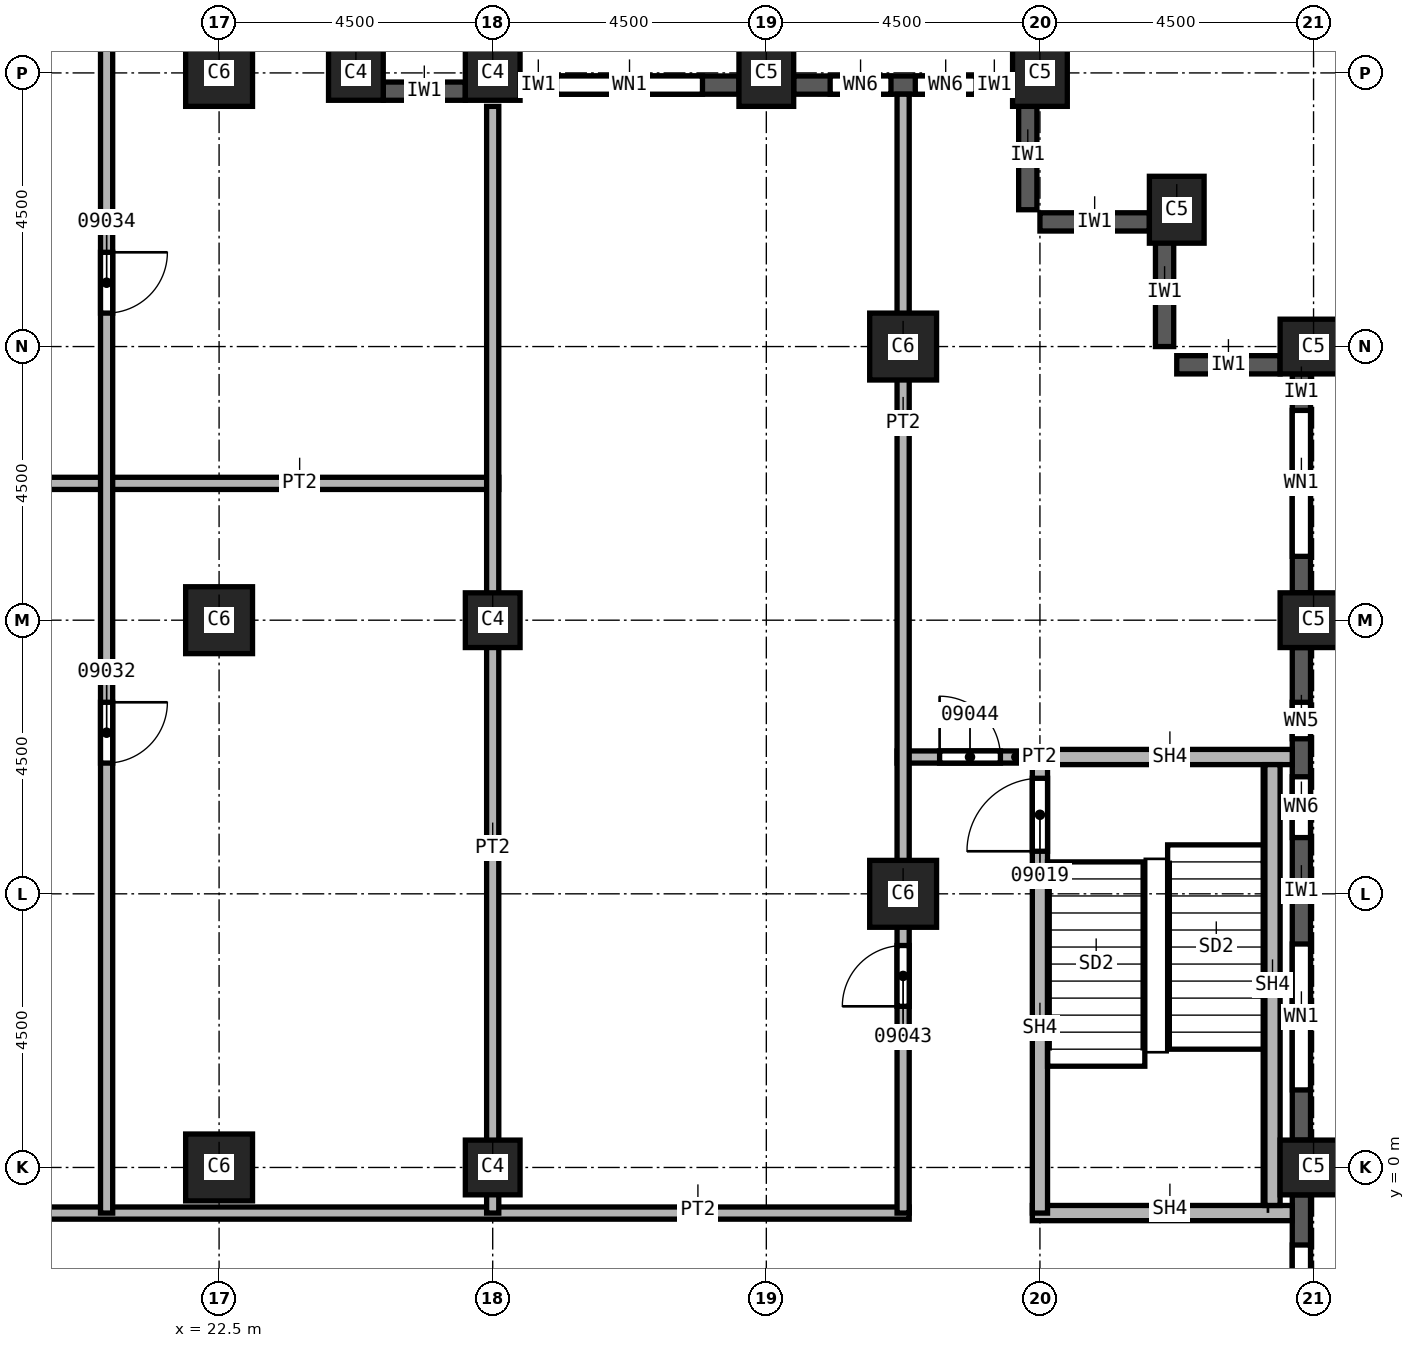
"""IFC4 building model, lengths in metres.
Left out: names, types, materials, properties, quantities, classifications, styles, units other than length and angle.
Written with IfcOpenShell. Run it as: python <this file> out.ifc"""

import sys

from ifc_helpers import new_model, si_unit, direction, frame, frame_2d, origin, origin_2d, place, context, subcontext, project, spatial, rectangle, extrude, element, fill, save


model = new_model("IFC4")
c1 = context("Model", 3, precision=1e-05, world=origin(), true_north=direction((0.0, 1.0)))
c2 = subcontext(c1, "Body", "Model", "MODEL_VIEW")
j1 = project(units=[si_unit("LENGTHUNIT", "METRE"), si_unit("PLANEANGLEUNIT", "RADIAN")], contexts=[c1])
p1 = place(None, origin())
s1 = spatial("IfcSite", under=j1, at=p1, CompositionType="ELEMENT")
p2 = place(p1, origin())
s2 = spatial("IfcBuilding", under=s1, at=p2, CompositionType="ELEMENT")
p3 = place(p2, frame((0.0, 0.0, 166.0)))
s3 = spatial("IfcBuildingStorey", under=s2, at=p3, CompositionType="ELEMENT", Elevation=166.0)
for number, where, z_axis, x_axis in (
    (1, (40.5, 0.0, 0.0), (0.0, 0.0, 1.0), (0.0, 1.0, 0.0)),
    (2, (40.5, 9.0, 0.0), (0.0, 0.0, 1.0), (0.0, 1.0, 0.0)),
    (3, (40.5, 13.5, 0.0), (0.0, 0.0, 1.0), (0.0, 1.0, 0.0)),
    (4, (38.25, 15.75, 0.0), (0.0, 0.0, 1.0), (1.0, 0.0, 0.0)),
    (5, (31.5, 18.0, 0.0), (0.0, 0.0, 1.0), (1.0, 0.0, 0.0)),
    (6, (36.0, 18.0, 0.0), (0.0, 0.0, 1.0), (1.0, 0.0, 0.0)),
):
    element("IfcColumn", number, at=place(p3, frame(where, z_axis=z_axis, x_axis=x_axis)), inside=s3, PredefinedType="COLUMN", context=c2, shape_type="SweptSolid", body=[
        extrude(rectangle(XDim=0.9, YDim=1.1, at=origin_2d()), origin(), (0.0, 0.0, 1.0), 3.7),
    ])
for number, where, z_axis, x_axis in (
    (7, (33.75, 4.5, 0.0), (0.0, 0.0, 1.0), (1.0, 0.0, 0.0)),
    (8, (33.75, 13.5, 0.0), (0.0, 0.0, 1.0), (1.0, 0.0, 0.0)),
    (9, (22.5, 0.0, 0.0), (0.0, 0.0, 1.0), (1.0, 0.0, 0.0)),
    (10, (22.5, 9.0, 0.0), (0.0, 0.0, 1.0), (1.0, 0.0, 0.0)),
    (11, (22.5, 18.0, 0.0), (0.0, 0.0, 1.0), (1.0, 0.0, 0.0)),
):
    element("IfcColumn", number, at=place(p3, frame(where, z_axis=z_axis, x_axis=x_axis)), inside=s3, PredefinedType="COLUMN", context=c2, shape_type="SweptSolid", body=[
        extrude(rectangle(XDim=1.1, YDim=1.1, at=origin_2d()), origin(), (0.0, 0.0, 1.0), 3.7),
    ])
for number, where, z_axis, x_axis in (
    (12, (27.0, 0.0, 0.0), (0.0, 0.0, 1.0), (1.0, 0.0, 0.0)),
    (13, (27.0, 9.0, 0.0), (0.0, 0.0, 1.0), (1.0, 0.0, 0.0)),
    (14, (27.0, 18.0, 0.0), (0.0, 0.0, 1.0), (1.0, 0.0, 0.0)),
    (15, (24.75, 18.0, 0.0), (0.0, 0.0, 1.0), (1.0, 0.0, 0.0)),
):
    element("IfcColumn", number, at=place(p3, frame(where, z_axis=z_axis, x_axis=x_axis)), inside=s3, PredefinedType="COLUMN", context=c2, shape_type="SweptSolid", body=[
        extrude(rectangle(XDim=0.9, YDim=0.9, at=origin_2d()), origin(), (0.0, 0.0, 1.0), 3.7),
    ])
p4 = place(p3, frame((39.95, 13.2, 0.0), z_axis=(0.0, 0.0, 1.0), x_axis=(-1.0, 0.0, 0.0)))
e16 = element("IfcWall", 16, at=p4, inside=s3, PredefinedType="SOLIDWALL", context=c2, shape_type="SweptSolid", body=[
    extrude(rectangle(XDim=1.7, YDim=0.3, at=frame_2d((0.85, 0.0))), origin(), (0.0, 0.0, 1.0), 3.1),
])
for number, where, z_axis, x_axis in (
    (17, (38.05, 15.3, 0.0), (0.0, 0.0, 1.0), (0.0, -1.0, 0.0)),
    (18, (37.8, 15.55, 0.0), (0.0, 0.0, 1.0), (-1.0, 0.0, 0.0)),
    (19, (35.8, 17.55, 0.0), (0.0, 0.0, 1.0), (0.0, -1.0, 0.0)),
):
    element("IfcWall", number, at=place(p3, frame(where, z_axis=z_axis, x_axis=x_axis)), inside=s3, PredefinedType="SOLIDWALL", context=c2, shape_type="SweptSolid", body=[
        extrude(rectangle(XDim=1.8, YDim=0.3, at=frame_2d((0.9, 0.0))), origin(), (0.0, 0.0, 1.0), 3.1),
    ])
p5 = place(p3, frame((40.3, -8.55, 0.0), z_axis=(0.0, 0.0, 1.0), x_axis=(0.0, 1.0, 0.0)))
e20 = element("IfcWall", 20, at=p5, inside=s3, PredefinedType="SOLIDWALL", context=c2, shape_type="SweptSolid", body=[
    extrude(rectangle(XDim=8.1, YDim=0.3, at=frame_2d((4.05, 0.0))), origin(), (0.0, 0.0, 1.0), 3.1),
])
p6 = place(p5, frame((0.825, 0.0, 0.8)))
e21 = element("IfcOpeningElement", 21, at=p6, cuts=e20, PredefinedType="OPENING", context=c2, shape_type="SweptSolid", body=[
    extrude(rectangle(XDim=2.4, YDim=1.95, at=frame_2d((1.2, 0.975))), frame((0.0, 0.15, 0.0), z_axis=(0.0, -1.0, 0.0), x_axis=(1.0, 0.0, 0.0)), (0.0, 0.0, 1.0), 0.3),
])
p7 = place(p5, frame((4.875, 0.0, 0.8)))
e22 = element("IfcOpeningElement", 22, at=p7, cuts=e20, PredefinedType="OPENING", context=c2, shape_type="SweptSolid", body=[
    extrude(rectangle(XDim=2.4, YDim=1.95, at=frame_2d((1.2, 0.975))), frame((0.0, 0.15, 0.0), z_axis=(0.0, -1.0, 0.0), x_axis=(1.0, 0.0, 0.0)), (0.0, 0.0, 1.0), 0.3),
])
p8 = place(p3, frame((40.3, 0.45, 0.0), z_axis=(0.0, 0.0, 1.0), x_axis=(0.0, 1.0, 0.0)))
e23 = element("IfcWall", 23, at=p8, inside=s3, PredefinedType="SOLIDWALL", context=c2, shape_type="SweptSolid", body=[
    extrude(rectangle(XDim=8.1, YDim=0.3, at=frame_2d((4.05, 0.0))), origin(), (0.0, 0.0, 1.0), 3.1),
])
p9 = place(p8, frame((0.825, 0.0, 0.8)))
e24 = element("IfcOpeningElement", 24, at=p9, cuts=e23, PredefinedType="OPENING", context=c2, shape_type="SweptSolid", body=[
    extrude(rectangle(XDim=2.4, YDim=1.95, at=frame_2d((1.2, 0.975))), frame((0.0, 0.15, 0.0), z_axis=(0.0, -1.0, 0.0), x_axis=(1.0, 0.0, 0.0)), (0.0, 0.0, 1.0), 0.3),
])
p10 = place(p8, frame((4.975, 0.0, 0.8)))
e25 = element("IfcOpeningElement", 25, at=p10, cuts=e23, PredefinedType="OPENING", context=c2, shape_type="SweptSolid", body=[
    extrude(rectangle(XDim=1.0, YDim=1.95, at=frame_2d((0.5, 0.975))), frame((0.0, 0.15, 0.0), z_axis=(0.0, -1.0, 0.0), x_axis=(1.0, 0.0, 0.0)), (0.0, 0.0, 1.0), 0.3),
])
p11 = place(p8, frame((6.6, 0.0, 0.8)))
e26 = element("IfcOpeningElement", 26, at=p11, cuts=e23, PredefinedType="OPENING", context=c2, shape_type="SweptSolid", body=[
    extrude(rectangle(XDim=0.6, YDim=1.95, at=frame_2d((0.3, 0.975))), frame((0.0, 0.15, 0.0), z_axis=(0.0, -1.0, 0.0), x_axis=(1.0, 0.0, 0.0)), (0.0, 0.0, 1.0), 0.3),
])
p12 = place(p3, frame((40.3, 9.45, 0.0), z_axis=(0.0, 0.0, 1.0), x_axis=(0.0, 1.0, 0.0)))
e27 = element("IfcWall", 27, at=p12, inside=s3, PredefinedType="SOLIDWALL", context=c2, shape_type="SweptSolid", body=[
    extrude(rectangle(XDim=3.6, YDim=0.3, at=frame_2d((1.8, 0.0))), origin(), (0.0, 0.0, 1.0), 3.1),
])
p13 = place(p12, frame((0.6, 0.0, 0.8)))
e28 = element("IfcOpeningElement", 28, at=p13, cuts=e27, PredefinedType="OPENING", context=c2, shape_type="SweptSolid", body=[
    extrude(rectangle(XDim=2.4, YDim=1.95, at=frame_2d((1.2, 0.975))), frame((0.0, 0.15, 0.0), z_axis=(0.0, -1.0, 0.0), x_axis=(1.0, 0.0, 0.0)), (0.0, 0.0, 1.0), 0.3),
])
p14 = place(p3, frame((35.55, 17.8, 0.0), z_axis=(0.0, 0.0, 1.0), x_axis=(-1.0, 0.0, 0.0)))
e29 = element("IfcWall", 29, at=p14, inside=s3, PredefinedType="SOLIDWALL", context=c2, shape_type="SweptSolid", body=[
    extrude(rectangle(XDim=3.6, YDim=0.3, at=frame_2d((1.8, 0.0))), origin(), (0.0, 0.0, 1.0), 3.1),
])
p15 = place(p14, frame((0.6, 0.0, 0.8)))
e30 = element("IfcOpeningElement", 30, at=p15, cuts=e29, PredefinedType="OPENING", context=c2, shape_type="SweptSolid", body=[
    extrude(rectangle(XDim=1.0, YDim=1.95, at=frame_2d((0.5, 0.975))), frame((0.0, 0.15, 0.0), z_axis=(0.0, -1.0, 0.0), x_axis=(1.0, 0.0, 0.0)), (0.0, 0.0, 1.0), 0.3),
])
p16 = place(p14, frame((2.0, 0.0, 0.8)))
e31 = element("IfcOpeningElement", 31, at=p16, cuts=e29, PredefinedType="OPENING", context=c2, shape_type="SweptSolid", body=[
    extrude(rectangle(XDim=1.0, YDim=1.95, at=frame_2d((0.5, 0.975))), frame((0.0, 0.15, 0.0), z_axis=(0.0, -1.0, 0.0), x_axis=(1.0, 0.0, 0.0)), (0.0, 0.0, 1.0), 0.3),
])
p17 = place(p3, frame((31.05, 17.8, 0.0), z_axis=(0.0, 0.0, 1.0), x_axis=(-1.0, 0.0, 0.0)))
e32 = element("IfcWall", 32, at=p17, inside=s3, PredefinedType="SOLIDWALL", context=c2, shape_type="SweptSolid", body=[
    extrude(rectangle(XDim=3.6, YDim=0.3, at=frame_2d((1.8, 0.0))), origin(), (0.0, 0.0, 1.0), 3.1),
])
p18 = place(p17, frame((0.6, 0.0, 0.8)))
e33 = element("IfcOpeningElement", 33, at=p18, cuts=e32, PredefinedType="OPENING", context=c2, shape_type="SweptSolid", body=[
    extrude(rectangle(XDim=2.4, YDim=1.95, at=frame_2d((1.2, 0.975))), frame((0.0, 0.15, 0.0), z_axis=(0.0, -1.0, 0.0), x_axis=(1.0, 0.0, 0.0)), (0.0, 0.0, 1.0), 0.3),
])
p19 = place(p3, frame((26.55, 17.7, 0.0), z_axis=(0.0, 0.0, 1.0), x_axis=(-1.0, 0.0, 0.0)))
e34 = element("IfcWall", 34, at=p19, inside=s3, PredefinedType="SOLIDWALL", context=c2, shape_type="SweptSolid", body=[
    extrude(rectangle(XDim=1.35, YDim=0.3, at=frame_2d((0.675, 0.0))), origin(), (0.0, 0.0, 1.0), 3.1),
])
p20 = place(p3, frame((15.4, -0.75, 0.0), z_axis=(0.0, 0.0, 1.0), x_axis=(1.0, 0.0, 0.0)))
e35 = element("IfcWall", 35, at=p20, inside=s3, PredefinedType="PARTITIONING", context=c2, shape_type="SweptSolid", body=[
    extrude(rectangle(XDim=18.45, YDim=0.2, at=frame_2d((9.225, 0.0))), origin(), (0.0, 0.0, 1.0), 3.7),
])
p21 = place(p3, frame((15.4, 11.25, 0.0), z_axis=(0.0, 0.0, 1.0), x_axis=(1.0, 0.0, 0.0)))
e36 = element("IfcWall", 36, at=p21, inside=s3, PredefinedType="PARTITIONING", context=c2, shape_type="SweptSolid", body=[
    extrude(rectangle(XDim=11.7, YDim=0.2, at=frame_2d((5.85, 0.0))), origin(), (0.0, 0.0, 1.0), 3.7),
])
p22 = place(p3, frame((20.65, 23.25, 0.0), z_axis=(0.0, 0.0, 1.0), x_axis=(0.0, -1.0, 0.0)))
e37 = element("IfcWall", 37, at=p22, inside=s3, PredefinedType="PARTITIONING", context=c2, shape_type="SweptSolid", body=[
    extrude(rectangle(XDim=24.0, YDim=0.2, at=frame_2d((12.0, 0.0))), origin(), (0.0, 0.0, 1.0), 3.7),
])
p23 = place(p22, frame((15.6, 0.0, 0.0)))
e38 = element("IfcOpeningElement", 38, at=p23, cuts=e37, PredefinedType="OPENING", context=c2, shape_type="SweptSolid", body=[
    extrude(rectangle(XDim=1.0, YDim=2.1, at=frame_2d((0.5, 1.05))), frame((0.0, 0.1, 0.0), z_axis=(0.0, -1.0, 0.0), x_axis=(1.0, 0.0, 0.0)), (0.0, 0.0, 1.0), 0.2),
])
p24 = place(p22, frame((8.2, 0.0, 0.0)))
e39 = element("IfcOpeningElement", 39, at=p24, cuts=e37, PredefinedType="OPENING", context=c2, shape_type="SweptSolid", body=[
    extrude(rectangle(XDim=1.0, YDim=2.1, at=frame_2d((0.5, 1.05))), frame((0.0, 0.1, 0.0), z_axis=(0.0, -1.0, 0.0), x_axis=(1.0, 0.0, 0.0)), (0.0, 0.0, 1.0), 0.2),
])
p25 = place(p3, frame((27.0, 17.45, 0.0), z_axis=(0.0, 0.0, 1.0), x_axis=(0.0, -1.0, 0.0)))
e40 = element("IfcWall", 40, at=p25, inside=s3, PredefinedType="PARTITIONING", context=c2, shape_type="SweptSolid", body=[
    extrude(rectangle(XDim=18.2, YDim=0.2, at=frame_2d((9.1, 0.0))), origin(), (0.0, 0.0, 1.0), 3.7),
])
p26 = place(p3, frame((33.65, 6.75, 0.0), z_axis=(0.0, 0.0, 1.0), x_axis=(1.0, 0.0, 0.0)))
e41 = element("IfcWall", 41, at=p26, inside=s3, PredefinedType="PARTITIONING", context=c2, shape_type="SweptSolid", body=[
    extrude(rectangle(XDim=2.35, YDim=0.2, at=frame_2d((1.175, 0.0))), origin(), (0.0, 0.0, 1.0), 3.7),
])
p27 = place(p26, frame((0.7, 0.0, 0.0)))
e42 = element("IfcOpeningElement", 42, at=p27, cuts=e41, PredefinedType="OPENING", context=c2, shape_type="SweptSolid", body=[
    extrude(rectangle(XDim=1.0, YDim=2.1, at=frame_2d((0.5, 1.05))), frame((0.0, 0.1, 0.0), z_axis=(0.0, -1.0, 0.0), x_axis=(1.0, 0.0, 0.0)), (0.0, 0.0, 1.0), 0.2),
])
p28 = place(p3, frame((33.75, -0.75, 0.0), z_axis=(0.0, 0.0, 1.0), x_axis=(0.0, 1.0, 0.0)))
e43 = element("IfcWall", 43, at=p28, inside=s3, PredefinedType="PARTITIONING", context=c2, shape_type="SweptSolid", body=[
    extrude(rectangle(XDim=18.4, YDim=0.2, at=frame_2d((9.2, 0.0))), origin(), (0.0, 0.0, 1.0), 3.7),
])
p29 = place(p28, frame((3.4, 0.0, 0.0)))
e44 = element("IfcOpeningElement", 44, at=p29, cuts=e43, PredefinedType="OPENING", context=c2, shape_type="SweptSolid", body=[
    extrude(rectangle(XDim=1.0, YDim=2.1, at=frame_2d((0.5, 1.05))), frame((0.0, 0.1, 0.0), z_axis=(0.0, -1.0, 0.0), x_axis=(1.0, 0.0, 0.0)), (0.0, 0.0, 1.0), 0.2),
])
p30 = place(p3, frame((35.875, -0.75, 0.0), z_axis=(0.0, 0.0, 1.0), x_axis=(1.0, 0.0, 0.0)))
e45 = element("IfcWall", 45, at=p30, inside=s3, PredefinedType="SOLIDWALL", context=c2, shape_type="SweptSolid", body=[
    extrude(rectangle(XDim=4.275, YDim=0.25, at=frame_2d((2.137, 0.0))), origin(), (0.0, 0.0, 1.0), 3.7),
])
p31 = place(p3, frame((36.0, -0.75, 0.0), z_axis=(0.0, 0.0, 1.0), x_axis=(0.0, 1.0, 0.0)))
e46 = element("IfcWall", 46, at=p31, inside=s3, PredefinedType="SOLIDWALL", context=c2, shape_type="SweptSolid", body=[
    extrude(rectangle(XDim=7.625, YDim=0.25, at=frame_2d((3.812, 0.0))), origin(), (0.0, 0.0, 1.0), 3.7),
])
p32 = place(p31, frame((5.95, 0.0, 0.0)))
e47 = element("IfcOpeningElement", 47, at=p32, cuts=e46, PredefinedType="OPENING", context=c2, shape_type="SweptSolid", body=[
    extrude(rectangle(XDim=1.2, YDim=2.1, at=frame_2d((0.6, 1.05))), frame((0.0, 0.125, 0.0), z_axis=(0.0, -1.0, 0.0), x_axis=(1.0, 0.0, 0.0)), (0.0, 0.0, 1.0), 0.25),
])
p33 = place(p3, frame((36.0, 6.75, 0.0), z_axis=(0.0, 0.0, 1.0), x_axis=(1.0, 0.0, 0.0)))
e48 = element("IfcWall", 48, at=p33, inside=s3, PredefinedType="SOLIDWALL", context=c2, shape_type="SweptSolid", body=[
    extrude(rectangle(XDim=4.15, YDim=0.25, at=frame_2d((2.075, 0.0))), origin(), (0.0, 0.0, 1.0), 3.7),
])
p34 = place(p3, frame((39.825, -0.625, 0.0), z_axis=(0.0, 0.0, 1.0), x_axis=(0.0, 1.0, 0.0)))
e49 = element("IfcWall", 49, at=p34, inside=s3, PredefinedType="SOLIDWALL", context=c2, shape_type="SweptSolid", body=[
    extrude(rectangle(XDim=7.25, YDim=0.25, at=frame_2d((3.625, 0.0))), origin(), (0.0, 0.0, 1.0), 3.7),
])
p35 = place(p7, origin())
e50 = element("IfcWindow", 50, at=p35, inside=s3, PartitioningType="SINGLE_PANEL", PredefinedType="WINDOW", context=c2, shape_type="SweptSolid", body=[
    extrude(rectangle(XDim=2.4, YDim=1.95, at=frame_2d((1.2, 0.975))), frame((0.0, 0.03, 0.0), z_axis=(0.0, -1.0, 0.0), x_axis=(1.0, 0.0, 0.0)), (0.0, 0.0, 1.0), 0.06),
])
fill(e22, e50)
p36 = place(p9, origin())
e51 = element("IfcWindow", 51, at=p36, inside=s3, PartitioningType="SINGLE_PANEL", PredefinedType="WINDOW", context=c2, shape_type="SweptSolid", body=[
    extrude(rectangle(XDim=2.4, YDim=1.95, at=frame_2d((1.2, 0.975))), frame((0.0, 0.03, 0.0), z_axis=(0.0, -1.0, 0.0), x_axis=(1.0, 0.0, 0.0)), (0.0, 0.0, 1.0), 0.06),
])
fill(e24, e51)
p37 = place(p13, origin())
e52 = element("IfcWindow", 52, at=p37, inside=s3, PartitioningType="SINGLE_PANEL", PredefinedType="WINDOW", context=c2, shape_type="SweptSolid", body=[
    extrude(rectangle(XDim=2.4, YDim=1.95, at=frame_2d((1.2, 0.975))), frame((0.0, 0.03, 0.0), z_axis=(0.0, -1.0, 0.0), x_axis=(1.0, 0.0, 0.0)), (0.0, 0.0, 1.0), 0.06),
])
fill(e28, e52)
p38 = place(p18, origin())
e53 = element("IfcWindow", 53, at=p38, inside=s3, PartitioningType="SINGLE_PANEL", PredefinedType="WINDOW", context=c2, shape_type="SweptSolid", body=[
    extrude(rectangle(XDim=2.4, YDim=1.95, at=frame_2d((1.2, 0.975))), frame((0.0, 0.03, 0.0), z_axis=(0.0, -1.0, 0.0), x_axis=(1.0, 0.0, 0.0)), (0.0, 0.0, 1.0), 0.06),
])
fill(e33, e53)
p39 = place(p32, origin())
e54 = element("IfcDoor", 54, at=p39, inside=s3, OperationType="SINGLE_SWING_RIGHT", PredefinedType="DOOR", context=c2, shape_type="SweptSolid", body=[
    extrude(rectangle(XDim=1.2, YDim=2.1, at=frame_2d((0.6, 1.05))), frame((0.0, 0.025, 0.0), z_axis=(0.0, -1.0, 0.0), x_axis=(1.0, 0.0, 0.0)), (0.0, 0.0, 1.0), 0.05),
])
fill(e47, e54)
p40 = place(p23, origin())
e55 = element("IfcDoor", 55, at=p40, inside=s3, OperationType="SINGLE_SWING_LEFT", PredefinedType="DOOR", context=c2, shape_type="SweptSolid", body=[
    extrude(rectangle(XDim=1.0, YDim=2.1, at=frame_2d((0.5, 1.05))), frame((0.0, 0.025, 0.0), z_axis=(0.0, -1.0, 0.0), x_axis=(1.0, 0.0, 0.0)), (0.0, 0.0, 1.0), 0.05),
])
fill(e38, e55)
p41 = place(p24, origin())
e56 = element("IfcDoor", 56, at=p41, inside=s3, OperationType="SINGLE_SWING_LEFT", PredefinedType="DOOR", context=c2, shape_type="SweptSolid", body=[
    extrude(rectangle(XDim=1.0, YDim=2.1, at=frame_2d((0.5, 1.05))), frame((0.0, 0.025, 0.0), z_axis=(0.0, -1.0, 0.0), x_axis=(1.0, 0.0, 0.0)), (0.0, 0.0, 1.0), 0.05),
])
fill(e39, e56)
p42 = place(p29, origin())
e57 = element("IfcDoor", 57, at=p42, inside=s3, OperationType="SINGLE_SWING_RIGHT", PredefinedType="DOOR", context=c2, shape_type="SweptSolid", body=[
    extrude(rectangle(XDim=1.0, YDim=2.1, at=frame_2d((0.5, 1.05))), frame((0.0, 0.025, 0.0), z_axis=(0.0, -1.0, 0.0), x_axis=(1.0, 0.0, 0.0)), (0.0, 0.0, 1.0), 0.05),
])
fill(e44, e57)
p43 = place(p27, origin())
e58 = element("IfcDoor", 58, at=p43, inside=s3, OperationType="SINGLE_SWING_LEFT", PredefinedType="DOOR", context=c2, shape_type="SweptSolid", body=[
    extrude(rectangle(XDim=1.0, YDim=2.1, at=frame_2d((0.5, 1.05))), frame((0.0, 0.025, 0.0), z_axis=(0.0, -1.0, 0.0), x_axis=(1.0, 0.0, 0.0)), (0.0, 0.0, 1.0), 0.05),
])
fill(e42, e58)
p44 = place(p10, origin())
e59 = element("IfcWindow", 59, at=p44, inside=s3, PartitioningType="SINGLE_PANEL", PredefinedType="WINDOW", context=c2, shape_type="SweptSolid", body=[
    extrude(rectangle(XDim=1.0, YDim=1.95, at=frame_2d((0.5, 0.975))), frame((0.0, 0.03, 0.0), z_axis=(0.0, -1.0, 0.0), x_axis=(1.0, 0.0, 0.0)), (0.0, 0.0, 1.0), 0.06),
])
fill(e25, e59)
p45 = place(p11, origin())
e60 = element("IfcWindow", 60, at=p45, inside=s3, PartitioningType="SINGLE_PANEL", PredefinedType="WINDOW", context=c2, shape_type="SweptSolid", body=[
    extrude(rectangle(XDim=0.6, YDim=1.95, at=frame_2d((0.3, 0.975))), frame((0.0, 0.03, 0.0), z_axis=(0.0, -1.0, 0.0), x_axis=(1.0, 0.0, 0.0)), (0.0, 0.0, 1.0), 0.06),
])
fill(e26, e60)
p46 = place(p15, origin())
e61 = element("IfcWindow", 61, at=p46, inside=s3, PartitioningType="SINGLE_PANEL", PredefinedType="WINDOW", context=c2, shape_type="SweptSolid", body=[
    extrude(rectangle(XDim=1.0, YDim=1.95, at=frame_2d((0.5, 0.975))), frame((0.0, 0.03, 0.0), z_axis=(0.0, -1.0, 0.0), x_axis=(1.0, 0.0, 0.0)), (0.0, 0.0, 1.0), 0.06),
])
fill(e30, e61)
p47 = place(p16, origin())
e62 = element("IfcWindow", 62, at=p47, inside=s3, PartitioningType="SINGLE_PANEL", PredefinedType="WINDOW", context=c2, shape_type="SweptSolid", body=[
    extrude(rectangle(XDim=1.0, YDim=1.95, at=frame_2d((0.5, 0.975))), frame((0.0, 0.03, 0.0), z_axis=(0.0, -1.0, 0.0), x_axis=(1.0, 0.0, 0.0)), (0.0, 0.0, 1.0), 0.06),
])
fill(e31, e62)
save(model, sys.argv[1])
